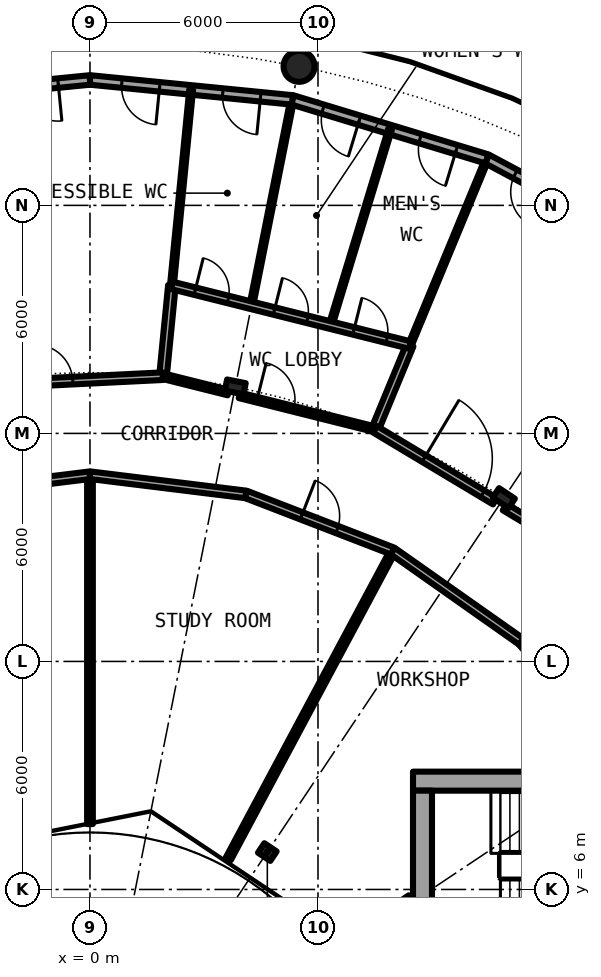
"""IFC4 building model, lengths in metres.
Left out: names, types, materials, properties, quantities, classifications, styles, units other than length and angle.
Written with IfcOpenShell. Run it as: python <this file> out.ifc"""

import sys

from ifc_helpers import new_model, si_unit, direction, frame, frame_2d, origin, origin_2d, place, context, subcontext, project, spatial, rectangle, hollow_circle, i_section, extrude, element, fill, save


model = new_model("IFC4")
c1 = context("Model", 3, precision=1e-05, world=origin(), true_north=direction((0.0, 1.0)))
c2 = subcontext(c1, "Body", "Model", "MODEL_VIEW")
j1 = project(units=[si_unit("LENGTHUNIT", "METRE"), si_unit("PLANEANGLEUNIT", "RADIAN")], contexts=[c1])
p1 = place(None, origin())
s1 = spatial("IfcSite", under=j1, at=p1, CompositionType="ELEMENT")
p2 = place(p1, origin())
s2 = spatial("IfcBuilding", under=s1, at=p2, CompositionType="ELEMENT")
p3 = place(p2, frame((0.0, 0.0, 157.4)))
s3 = spatial("IfcBuildingStorey", under=s2, at=p3, CompositionType="ELEMENT", Elevation=157.4)
p4 = place(p3, frame((5.501, 27.658, 0.0), z_axis=(0.0, 0.0, 1.0), x_axis=(1.0, 0.0, 0.0)))
e1 = element("IfcColumn", 1, at=p4, inside=s3, PredefinedType="COLUMN", context=c2, shape_type="SweptSolid", body=[
    extrude(hollow_circle(Radius=0.406, WallThickness=0.04, at=origin_2d()), origin(), (0.0, 0.0, 1.0), 4.2),
])
for number, where, z_axis, x_axis in (
    (2, (10.889, 16.297, 0.0), (0.0, 0.0, 1.0), (0.556, 0.831, 0.0)),
    (3, (3.824, 19.223, 0.0), (0.0, 0.0, 1.0), (0.195, 0.981, 0.0)),
):
    element("IfcColumn", number, at=place(p3, frame(where, z_axis=z_axis, x_axis=x_axis)), inside=s3, PredefinedType="COLUMN", context=c2, shape_type="SweptSolid", body=[
        extrude(i_section(OverallWidth=0.3, OverallDepth=0.5, WebThickness=0.014, FlangeThickness=0.028, FilletRadius=0.027, at=origin_2d()), origin(), (0.0, 0.0, 1.0), 4.2),
    ])
p5 = place(p3, frame((4.667, 6.984, 0.0), z_axis=(0.0, 0.0, 1.0), x_axis=(0.55557023302, 0.831469612303, 0.0)))
e4 = element("IfcColumn", 4, at=p5, inside=s3, PredefinedType="COLUMN", context=c2, shape_type="SweptSolid", body=[
    extrude(i_section(OverallWidth=0.3, OverallDepth=0.39, WebThickness=0.011, FlangeThickness=0.019, FilletRadius=0.027, at=origin_2d()), origin(), (0.0, 0.0, 1.0), 4.2),
])
p6 = place(p3, frame((15.167, 22.699, 0.0), z_axis=(0.0, 0.0, 1.0), x_axis=(-0.881915646801, 0.471407246368, 0.0)))
e5 = element("IfcWall", 5, at=p6, inside=s3, PredefinedType="SOLIDWALL", context=c2, shape_type="SweptSolid", body=[
    extrude(rectangle(XDim=5.352, YDim=0.25, at=frame_2d((2.676, 0.0))), origin(), (0.0, 0.0, 1.0), 3.85),
])
p7 = place(p6, frame((0.841, 0.0, 0.0)))
e6 = element("IfcOpeningElement", 6, at=p7, cuts=e5, PredefinedType="OPENING", context=c2, shape_type="SweptSolid", body=[
    extrude(rectangle(XDim=1.0, YDim=2.2, at=frame_2d((0.5, 1.1))), frame((0.0, 0.135, 0.0), z_axis=(0.0, -1.0, 0.0), x_axis=(1.0, 0.0, 0.0)), (0.0, 0.0, 1.0), 0.27),
])
p8 = place(p6, frame((3.51, 0.0, 0.0)))
e7 = element("IfcOpeningElement", 7, at=p8, cuts=e5, PredefinedType="OPENING", context=c2, shape_type="SweptSolid", body=[
    extrude(rectangle(XDim=1.0, YDim=2.2, at=frame_2d((0.5, 1.1))), frame((0.0, 0.135, 0.0), z_axis=(0.0, -1.0, 0.0), x_axis=(1.0, 0.0, 0.0)), (0.0, 0.0, 1.0), 0.27),
])
p9 = place(p3, frame((10.447, 25.222, 0.0), z_axis=(0.0, 0.0, 1.0), x_axis=(-0.956965678721, 0.290201119486, 0.0)))
e8 = element("IfcWall", 8, at=p9, inside=s3, PredefinedType="SOLIDWALL", context=c2, shape_type="SweptSolid", body=[
    extrude(rectangle(XDim=5.351, YDim=0.25, at=frame_2d((2.676, 0.0))), origin(), (0.0, 0.0, 1.0), 3.85),
])
p10 = place(p9, frame((0.841, 0.0, 0.0)))
e9 = element("IfcOpeningElement", 9, at=p10, cuts=e8, PredefinedType="OPENING", context=c2, shape_type="SweptSolid", body=[
    extrude(rectangle(XDim=1.0, YDim=2.2, at=frame_2d((0.5, 1.1))), frame((0.0, 0.135, 0.0), z_axis=(0.0, -1.0, 0.0), x_axis=(1.0, 0.0, 0.0)), (0.0, 0.0, 1.0), 0.27),
])
p11 = place(p9, frame((3.51, 0.0, 0.0)))
e10 = element("IfcOpeningElement", 10, at=p11, cuts=e8, PredefinedType="OPENING", context=c2, shape_type="SweptSolid", body=[
    extrude(rectangle(XDim=1.0, YDim=2.2, at=frame_2d((0.5, 1.1))), frame((0.0, 0.135, 0.0), z_axis=(0.0, -1.0, 0.0), x_axis=(1.0, 0.0, 0.0)), (0.0, 0.0, 1.0), 0.27),
])
p12 = place(p3, frame((5.326, 26.775, 0.0), z_axis=(0.0, 0.0, 1.0), x_axis=(-0.995173996315, 0.098126026407, 0.0)))
e11 = element("IfcWall", 11, at=p12, inside=s3, PredefinedType="SOLIDWALL", context=c2, shape_type="SweptSolid", body=[
    extrude(rectangle(XDim=5.352, YDim=0.25, at=frame_2d((2.676, 0.0))), origin(), (0.0, 0.0, 1.0), 3.85),
])
p13 = place(p12, frame((0.841, 0.0, 0.0)))
e12 = element("IfcOpeningElement", 12, at=p13, cuts=e11, PredefinedType="OPENING", context=c2, shape_type="SweptSolid", body=[
    extrude(rectangle(XDim=1.0, YDim=2.2, at=frame_2d((0.5, 1.1))), frame((0.0, 0.135, 0.0), z_axis=(0.0, -1.0, 0.0), x_axis=(1.0, 0.0, 0.0)), (0.0, 0.0, 1.0), 0.27),
])
p14 = place(p12, frame((3.51, 0.0, 0.0)))
e13 = element("IfcOpeningElement", 13, at=p14, cuts=e11, PredefinedType="OPENING", context=c2, shape_type="SweptSolid", body=[
    extrude(rectangle(XDim=1.0, YDim=2.2, at=frame_2d((0.5, 1.1))), frame((0.0, 0.135, 0.0), z_axis=(0.0, -1.0, 0.0), x_axis=(1.0, 0.0, 0.0)), (0.0, 0.0, 1.0), 0.27),
])
p15 = place(p3, frame((0.0, 27.3, 0.0), z_axis=(0.0, 0.0, 1.0), x_axis=(-0.995173996315, -0.098126026407, 0.0)))
e14 = element("IfcWall", 14, at=p15, inside=s3, PredefinedType="SOLIDWALL", context=c2, shape_type="SweptSolid", body=[
    extrude(rectangle(XDim=5.352, YDim=0.25, at=frame_2d((2.676, 0.0))), origin(), (0.0, 0.0, 1.0), 3.85),
])
p16 = place(p15, frame((0.841, 0.0, 0.0)))
e15 = element("IfcOpeningElement", 15, at=p16, cuts=e14, PredefinedType="OPENING", context=c2, shape_type="SweptSolid", body=[
    extrude(rectangle(XDim=1.0, YDim=2.2, at=frame_2d((0.5, 1.1))), frame((0.0, 0.135, 0.0), z_axis=(0.0, -1.0, 0.0), x_axis=(1.0, 0.0, 0.0)), (0.0, 0.0, 1.0), 0.27),
])
p17 = place(p15, frame((3.51, 0.0, 0.0)))
e16 = element("IfcOpeningElement", 16, at=p17, cuts=e14, PredefinedType="OPENING", context=c2, shape_type="SweptSolid", body=[
    extrude(rectangle(XDim=1.0, YDim=2.2, at=frame_2d((0.5, 1.1))), frame((0.0, 0.135, 0.0), z_axis=(0.0, -1.0, 0.0), x_axis=(1.0, 0.0, 0.0)), (0.0, 0.0, 1.0), 0.27),
])
p18 = place(p3, frame((22.1, 8.85, 0.0), z_axis=(0.0, 0.0, 1.0), x_axis=(-1.0, 0.0, 0.0)))
e17 = element("IfcWall", 17, at=p18, inside=s3, PredefinedType="SHEAR", context=c2, shape_type="SweptSolid", body=[
    extrude(rectangle(XDim=13.6, YDim=0.5, at=frame_2d((6.8, 0.0))), origin(), (0.0, 0.0, 1.0), 4.2),
])
p19 = place(p18, frame((1.025, 0.0, 0.0)))
e18 = element("IfcOpeningElement", 18, at=p19, cuts=e17, PredefinedType="OPENING", context=c2, shape_type="SweptSolid", body=[
    extrude(rectangle(XDim=1.2, YDim=2.3, at=frame_2d((0.6, 1.15))), frame((0.0, 0.26, 0.0), z_axis=(0.0, -1.0, 0.0), x_axis=(1.0, 0.0, 0.0)), (0.0, 0.0, 1.0), 0.52),
])
p20 = place(p3, frame((8.75, -8.6, 0.0), z_axis=(0.0, 0.0, 1.0), x_axis=(0.0, 1.0, 0.0)))
e19 = element("IfcWall", 19, at=p20, inside=s3, PredefinedType="SHEAR", context=c2, shape_type="SweptSolid", body=[
    extrude(rectangle(XDim=17.2, YDim=0.5, at=frame_2d((8.6, 0.0))), origin(), (0.0, 0.0, 1.0), 4.2),
])
p21 = place(p20, frame((7.4, 0.0, 0.1)))
e20 = element("IfcOpeningElement", 20, at=p21, cuts=e19, PredefinedType="OPENING", context=c2, shape_type="SweptSolid", body=[
    extrude(rectangle(XDim=2.4, YDim=2.2, at=frame_2d((1.2, 1.1))), frame((0.0, 0.26, 0.0), z_axis=(0.0, -1.0, 0.0), x_axis=(1.0, 0.0, 0.0)), (0.0, 0.0, 1.0), 0.52),
])
p22 = place(p3, frame((0.0, 7.72, 0.0), z_axis=(0.0, 0.0, 1.0), x_axis=(0.0, 1.0, 0.0)))
e21 = element("IfcWall", 21, at=p22, inside=s3, PredefinedType="PARTITIONING", context=c2, shape_type="SweptSolid", body=[
    extrude(rectangle(XDim=9.18, YDim=0.15, at=frame_2d((4.59, 0.0))), origin(), (0.0, 0.0, 1.0), 3.85),
])
p23 = place(p3, frame((1.921, 19.506, 0.0), z_axis=(0.0, 0.0, 1.0), x_axis=(0.097982433599, 0.995188144376, 0.0)))
e22 = element("IfcWall", 22, at=p23, inside=s3, PredefinedType="PARTITIONING", context=c2, shape_type="SweptSolid", body=[
    extrude(rectangle(XDim=2.399, YDim=0.2, at=frame_2d((1.2, 0.0))), origin(), (0.0, 0.0, 1.0), 3.85),
])
p24 = place(p3, frame((2.156, 21.894, 0.0), z_axis=(0.0, 0.0, 1.0), x_axis=(0.097990148768, 0.995187384739, 0.0)))
e23 = element("IfcWall", 23, at=p24, inside=s3, PredefinedType="PARTITIONING", context=c2, shape_type="SweptSolid", body=[
    extrude(rectangle(XDim=5.175, YDim=0.1, at=frame_2d((2.587, 0.0))), origin(), (0.0, 0.0, 1.0), 3.85),
])
p25 = place(p3, frame((3.641, 6.807, 0.0), z_axis=(0.0, 0.0, 1.0), x_axis=(0.471428625665, 0.881904218667, 0.0)))
e24 = element("IfcWall", 24, at=p25, inside=s3, PredefinedType="PARTITIONING", context=c2, shape_type="SweptSolid", body=[
    extrude(rectangle(XDim=9.18, YDim=0.15, at=frame_2d((4.59, 0.0))), origin(), (0.0, 0.0, 1.0), 3.85),
])
p26 = place(p3, frame((4.246, 21.371, 0.0), z_axis=(0.0, 0.0, 1.0), x_axis=(0.195122379873, 0.980778903154, 0.0)))
e25 = element("IfcWall", 25, at=p26, inside=s3, PredefinedType="PARTITIONING", context=c2, shape_type="SweptSolid", body=[
    extrude(rectangle(XDim=5.386, YDim=0.1, at=frame_2d((2.693, 0.0))), origin(), (0.0, 0.0, 1.0), 3.85),
])
p27 = place(p3, frame((6.331, 20.848, 0.0), z_axis=(0.0, 0.0, 1.0), x_axis=(0.290701687048, 0.956813737959, 0.0)))
e26 = element("IfcWall", 26, at=p27, inside=s3, PredefinedType="PARTITIONING", context=c2, shape_type="SweptSolid", body=[
    extrude(rectangle(XDim=5.387, YDim=0.1, at=frame_2d((2.693, 0.0))), origin(), (0.0, 0.0, 1.0), 3.85),
])
p28 = place(p3, frame((7.501, 18.108, 0.0), z_axis=(0.0, 0.0, 1.0), x_axis=(0.382555476978, 0.923932522988, 0.0)))
e27 = element("IfcWall", 27, at=p28, inside=s3, PredefinedType="PARTITIONING", context=c2, shape_type="SweptSolid", body=[
    extrude(rectangle(XDim=2.4, YDim=0.2, at=frame_2d((1.2, 0.0))), origin(), (0.0, 0.0, 1.0), 3.85),
])
p29 = place(p3, frame((8.419, 20.325, 0.0), z_axis=(0.0, 0.0, 1.0), x_axis=(0.382621247276, 0.923905287967, 0.0)))
e28 = element("IfcWall", 28, at=p29, inside=s3, PredefinedType="PARTITIONING", context=c2, shape_type="SweptSolid", body=[
    extrude(rectangle(XDim=5.175, YDim=0.1, at=frame_2d((2.587, 0.0))), origin(), (0.0, 0.0, 1.0), 3.85),
])
p30 = place(p3, frame((6.513, 4.472, 0.0), z_axis=(0.0, 0.0, 1.0), x_axis=(0.83133816625, 0.555766905579, 0.0)))
e29 = element("IfcWall", 29, at=p30, inside=s3, PredefinedType="PARTITIONING", context=c2, shape_type="SweptSolid", body=[
    extrude(rectangle(XDim=2.323, YDim=0.2, at=frame_2d((1.162, 0.0))), origin(), (0.0, 0.0, 1.0), 3.85),
])
for number, where, z_axis, x_axis in (
    (30, (-4.106, 16.394, 0.0), (0.0, 0.0, 1.0), (0.992, 0.122, 0.0)),
    (31, (0.0, 16.9, 0.0), (0.0, 0.0, 1.0), (0.992, -0.122, 0.0)),
):
    element("IfcWall", number, at=place(p3, frame(where, z_axis=z_axis, x_axis=x_axis)), inside=s3, PredefinedType="PARTITIONING", context=c2, shape_type="SweptSolid", body=[
        extrude(rectangle(XDim=4.137, YDim=0.2, at=frame_2d((2.068, 0.0))), origin(), (0.0, 0.0, 1.0), 3.85),
    ])
p31 = place(p3, frame((4.106, 16.394, 0.0), z_axis=(0.0, 0.0, 1.0), x_axis=(0.932943640288, -0.360022449363, 0.0)))
e32 = element("IfcWall", 32, at=p31, inside=s3, PredefinedType="PARTITIONING", context=c2, shape_type="SweptSolid", body=[
    extrude(rectangle(XDim=4.139, YDim=0.2, at=frame_2d((2.069, 0.0))), origin(), (0.0, 0.0, 1.0), 3.85),
])
p32 = place(p31, frame((1.569, 0.0, 0.0)))
e33 = element("IfcOpeningElement", 33, at=p32, cuts=e32, PredefinedType="OPENING", context=c2, shape_type="SweptSolid", body=[
    extrude(rectangle(XDim=1.0, YDim=2.3, at=frame_2d((0.5, 1.15))), frame((0.0, 0.11, 0.0), z_axis=(0.0, -1.0, 0.0), x_axis=(1.0, 0.0, 0.0)), (0.0, 0.0, 1.0), 0.22),
])
p33 = place(p3, frame((7.967, 14.904, 0.0), z_axis=(0.0, 0.0, 1.0), x_axis=(0.817567680547, -0.575832517079, 0.0)))
e34 = element("IfcWall", 34, at=p33, inside=s3, PredefinedType="PARTITIONING", context=c2, shape_type="SweptSolid", body=[
    extrude(rectangle(XDim=4.137, YDim=0.2, at=frame_2d((2.068, 0.0))), origin(), (0.0, 0.0, 1.0), 3.85),
])
p34 = place(p3, frame((11.349, 12.522, 0.0), z_axis=(0.0, 0.0, 1.0), x_axis=(0.653273870261, -0.757121687996, 0.0)))
e35 = element("IfcWall", 35, at=p34, inside=s3, PredefinedType="PARTITIONING", context=c2, shape_type="SweptSolid", body=[
    extrude(rectangle(XDim=4.189, YDim=0.2, at=frame_2d((2.095, 0.0))), origin(), (0.0, 0.0, 1.0), 3.85),
])
p35 = place(p34, frame((1.569, 0.0, 0.0)))
e36 = element("IfcOpeningElement", 36, at=p35, cuts=e35, PredefinedType="OPENING", context=c2, shape_type="SweptSolid", body=[
    extrude(rectangle(XDim=1.0, YDim=2.3, at=frame_2d((0.5, 1.15))), frame((0.0, 0.11, 0.0), z_axis=(0.0, -1.0, 0.0), x_axis=(1.0, 0.0, 0.0)), (0.0, 0.0, 1.0), 0.22),
])
p36 = place(p3, frame((-3.672, 19.23, 0.0), z_axis=(0.0, 0.0, 1.0), x_axis=(0.998783562084, 0.049309188909, 0.0)))
e37 = element("IfcWall", 37, at=p36, inside=s3, PredefinedType="PARTITIONING", context=c2, shape_type="SweptSolid", body=[
    extrude(rectangle(XDim=5.6, YDim=0.2, at=frame_2d((2.8, 0.0))), origin(), (0.0, 0.0, 1.0), 3.54),
])
p37 = place(p36, frame((2.224, 0.0, 0.0)))
e38 = element("IfcOpeningElement", 38, at=p37, cuts=e37, PredefinedType="OPENING", context=c2, shape_type="SweptSolid", body=[
    extrude(rectangle(XDim=1.0, YDim=2.3, at=frame_2d((0.5, 1.15))), frame((0.0, 0.11, 0.0), z_axis=(0.0, -1.0, 0.0), x_axis=(1.0, 0.0, 0.0)), (0.0, 0.0, 1.0), 0.22),
])
p38 = place(p3, frame((1.921, 19.506, 0.0), z_axis=(0.0, 0.0, 1.0), x_axis=(0.969996560647, -0.243118638391, 0.0)))
e39 = element("IfcWall", 39, at=p38, inside=s3, PredefinedType="PARTITIONING", context=c2, shape_type="SweptSolid", body=[
    extrude(rectangle(XDim=1.773, YDim=0.15, at=frame_2d((0.887, 0.0))), origin(), (0.0, 0.0, 1.0), 3.54),
])
p39 = place(p3, frame((3.933, 19.002, 0.0), z_axis=(0.0, 0.0, 1.0), x_axis=(0.970009604092, -0.243066591637, 0.0)))
e40 = element("IfcWall", 40, at=p39, inside=s3, PredefinedType="PARTITIONING", context=c2, shape_type="SweptSolid", body=[
    extrude(rectangle(XDim=3.678, YDim=0.15, at=frame_2d((1.839, 0.0))), origin(), (0.0, 0.0, 1.0), 3.54),
])
p40 = place(p39, frame((0.476, 0.0, 0.0)))
e41 = element("IfcOpeningElement", 41, at=p40, cuts=e40, PredefinedType="OPENING", context=c2, shape_type="SweptSolid", body=[
    extrude(rectangle(XDim=1.0, YDim=2.3, at=frame_2d((0.5, 1.15))), frame((0.0, 0.085, 0.0), z_axis=(0.0, -1.0, 0.0), x_axis=(1.0, 0.0, 0.0)), (0.0, 0.0, 1.0), 0.17),
])
p41 = place(p3, frame((7.501, 18.108, 0.0), z_axis=(0.0, 0.0, 1.0), x_axis=(0.857750505244, -0.514066212421, 0.0)))
e42 = element("IfcWall", 42, at=p41, inside=s3, PredefinedType="PARTITIONING", context=c2, shape_type="SweptSolid", body=[
    extrude(rectangle(XDim=3.678, YDim=0.2, at=frame_2d((1.839, 0.0))), origin(), (0.0, 0.0, 1.0), 3.54),
])
p42 = place(p41, frame((1.5, 0.0, 0.0)))
e43 = element("IfcOpeningElement", 43, at=p42, cuts=e42, PredefinedType="OPENING", context=c2, shape_type="SweptSolid", body=[
    extrude(rectangle(XDim=1.8, YDim=2.3, at=frame_2d((0.9, 1.15))), frame((0.0, 0.11, 0.0), z_axis=(0.0, -1.0, 0.0), x_axis=(1.0, 0.0, 0.0)), (0.0, 0.0, 1.0), 0.22),
])
p43 = place(p3, frame((10.913, 16.063, 0.0), z_axis=(0.0, 0.0, 1.0), x_axis=(0.857614365469, -0.514293301668, 0.0)))
e44 = element("IfcWall", 44, at=p43, inside=s3, PredefinedType="PARTITIONING", context=c2, shape_type="SweptSolid", body=[
    extrude(rectangle(XDim=1.773, YDim=0.2, at=frame_2d((0.887, 0.0))), origin(), (0.0, 0.0, 1.0), 3.54),
])
p44 = place(p3, frame((2.156, 21.894, 0.0), z_axis=(0.0, 0.0, 1.0), x_axis=(0.970020040157, -0.243024940478, 0.0)))
e45 = element("IfcWall", 45, at=p44, inside=s3, PredefinedType="PARTITIONING", context=c2, shape_type="SweptSolid", body=[
    extrude(rectangle(XDim=6.457, YDim=0.2, at=frame_2d((3.228, 0.0))), origin(), (0.0, 0.0, 1.0), 3.85),
])
p45 = place(p44, frame((4.93, 0.0, 0.0)))
e46 = element("IfcOpeningElement", 46, at=p45, cuts=e45, PredefinedType="OPENING", context=c2, shape_type="SweptSolid", body=[
    extrude(rectangle(XDim=0.9, YDim=2.3, at=frame_2d((0.45, 1.15))), frame((0.0, 0.11, 0.0), z_axis=(0.0, -1.0, 0.0), x_axis=(1.0, 0.0, 0.0)), (0.0, 0.0, 1.0), 0.22),
])
p46 = place(p44, frame((2.774, 0.0, 0.0)))
e47 = element("IfcOpeningElement", 47, at=p46, cuts=e45, PredefinedType="OPENING", context=c2, shape_type="SweptSolid", body=[
    extrude(rectangle(XDim=0.9, YDim=2.3, at=frame_2d((0.45, 1.15))), frame((0.0, 0.11, 0.0), z_axis=(0.0, -1.0, 0.0), x_axis=(1.0, 0.0, 0.0)), (0.0, 0.0, 1.0), 0.22),
])
p47 = place(p44, frame((0.625, 0.0, 0.0)))
e48 = element("IfcOpeningElement", 48, at=p47, cuts=e45, PredefinedType="OPENING", context=c2, shape_type="SweptSolid", body=[
    extrude(rectangle(XDim=0.9, YDim=2.3, at=frame_2d((0.45, 1.15))), frame((0.0, 0.11, 0.0), z_axis=(0.0, -1.0, 0.0), x_axis=(1.0, 0.0, 0.0)), (0.0, 0.0, 1.0), 0.22),
])
p48 = place(p8, origin())
e49 = element("IfcDoor", 49, at=p48, inside=s3, OperationType="SINGLE_SWING_LEFT", PredefinedType="DOOR", context=c2, shape_type="SweptSolid", body=[
    extrude(rectangle(XDim=1.0, YDim=2.2, at=frame_2d((0.5, 1.1))), frame((0.0, 0.025, 0.0), z_axis=(0.0, -1.0, 0.0), x_axis=(1.0, 0.0, 0.0)), (0.0, 0.0, 1.0), 0.05),
])
fill(e7, e49)
p49 = place(p10, origin())
e50 = element("IfcDoor", 50, at=p49, inside=s3, OperationType="SINGLE_SWING_LEFT", PredefinedType="DOOR", context=c2, shape_type="SweptSolid", body=[
    extrude(rectangle(XDim=1.0, YDim=2.2, at=frame_2d((0.5, 1.1))), frame((0.0, 0.025, 0.0), z_axis=(0.0, -1.0, 0.0), x_axis=(1.0, 0.0, 0.0)), (0.0, 0.0, 1.0), 0.05),
])
fill(e9, e50)
p50 = place(p11, origin())
e51 = element("IfcDoor", 51, at=p50, inside=s3, OperationType="SINGLE_SWING_LEFT", PredefinedType="DOOR", context=c2, shape_type="SweptSolid", body=[
    extrude(rectangle(XDim=1.0, YDim=2.2, at=frame_2d((0.5, 1.1))), frame((0.0, 0.025, 0.0), z_axis=(0.0, -1.0, 0.0), x_axis=(1.0, 0.0, 0.0)), (0.0, 0.0, 1.0), 0.05),
])
fill(e10, e51)
p51 = place(p13, origin())
e52 = element("IfcDoor", 52, at=p51, inside=s3, OperationType="SINGLE_SWING_LEFT", PredefinedType="DOOR", context=c2, shape_type="SweptSolid", body=[
    extrude(rectangle(XDim=1.0, YDim=2.2, at=frame_2d((0.5, 1.1))), frame((0.0, 0.025, 0.0), z_axis=(0.0, -1.0, 0.0), x_axis=(1.0, 0.0, 0.0)), (0.0, 0.0, 1.0), 0.05),
])
fill(e12, e52)
p52 = place(p14, origin())
e53 = element("IfcDoor", 53, at=p52, inside=s3, OperationType="SINGLE_SWING_LEFT", PredefinedType="DOOR", context=c2, shape_type="SweptSolid", body=[
    extrude(rectangle(XDim=1.0, YDim=2.2, at=frame_2d((0.5, 1.1))), frame((0.0, 0.025, 0.0), z_axis=(0.0, -1.0, 0.0), x_axis=(1.0, 0.0, 0.0)), (0.0, 0.0, 1.0), 0.05),
])
fill(e13, e53)
p53 = place(p16, origin())
e54 = element("IfcDoor", 54, at=p53, inside=s3, OperationType="SINGLE_SWING_LEFT", PredefinedType="DOOR", context=c2, shape_type="SweptSolid", body=[
    extrude(rectangle(XDim=1.0, YDim=2.2, at=frame_2d((0.5, 1.1))), frame((0.0, 0.025, 0.0), z_axis=(0.0, -1.0, 0.0), x_axis=(1.0, 0.0, 0.0)), (0.0, 0.0, 1.0), 0.05),
])
fill(e15, e54)
p54 = place(p40, origin())
e55 = element("IfcDoor", 55, at=p54, inside=s3, OperationType="SINGLE_SWING_LEFT", PredefinedType="DOOR", context=c2, shape_type="SweptSolid", body=[
    extrude(rectangle(XDim=1.0, YDim=2.3, at=frame_2d((0.5, 1.15))), frame((0.0, 0.025, 0.0), z_axis=(0.0, -1.0, 0.0), x_axis=(1.0, 0.0, 0.0)), (0.0, 0.0, 1.0), 0.05),
])
fill(e41, e55)
p55 = place(p45, origin())
e56 = element("IfcDoor", 56, at=p55, inside=s3, OperationType="SINGLE_SWING_RIGHT", PredefinedType="DOOR", context=c2, shape_type="SweptSolid", body=[
    extrude(rectangle(XDim=0.9, YDim=2.3, at=frame_2d((0.45, 1.15))), frame((0.0, 0.025, 0.0), z_axis=(0.0, -1.0, 0.0), x_axis=(1.0, 0.0, 0.0)), (0.0, 0.0, 1.0), 0.05),
])
fill(e46, e56)
p56 = place(p46, origin())
e57 = element("IfcDoor", 57, at=p56, inside=s3, OperationType="SINGLE_SWING_LEFT", PredefinedType="DOOR", context=c2, shape_type="SweptSolid", body=[
    extrude(rectangle(XDim=0.9, YDim=2.3, at=frame_2d((0.45, 1.15))), frame((0.0, 0.025, 0.0), z_axis=(0.0, -1.0, 0.0), x_axis=(1.0, 0.0, 0.0)), (0.0, 0.0, 1.0), 0.05),
])
fill(e47, e57)
p57 = place(p47, origin())
e58 = element("IfcDoor", 58, at=p57, inside=s3, OperationType="SINGLE_SWING_LEFT", PredefinedType="DOOR", context=c2, shape_type="SweptSolid", body=[
    extrude(rectangle(XDim=0.9, YDim=2.3, at=frame_2d((0.45, 1.15))), frame((0.0, 0.025, 0.0), z_axis=(0.0, -1.0, 0.0), x_axis=(1.0, 0.0, 0.0)), (0.0, 0.0, 1.0), 0.05),
])
fill(e48, e58)
p58 = place(p42, origin())
e59 = element("IfcDoor", 59, at=p58, inside=s3, OperationType="DOUBLE_DOOR_SINGLE_SWING", PredefinedType="DOOR", context=c2, shape_type="SweptSolid", body=[
    extrude(rectangle(XDim=1.8, YDim=2.3, at=frame_2d((0.9, 1.15))), frame((0.0, 0.025, 0.0), z_axis=(0.0, -1.0, 0.0), x_axis=(1.0, 0.0, 0.0)), (0.0, 0.0, 1.0), 0.05),
])
fill(e43, e59)
p59 = place(p37, origin())
e60 = element("IfcDoor", 60, at=p59, inside=s3, OperationType="SINGLE_SWING_LEFT", PredefinedType="DOOR", context=c2, shape_type="SweptSolid", body=[
    extrude(rectangle(XDim=1.0, YDim=2.3, at=frame_2d((0.5, 1.15))), frame((0.0, 0.025, 0.0), z_axis=(0.0, -1.0, 0.0), x_axis=(1.0, 0.0, 0.0)), (0.0, 0.0, 1.0), 0.05),
])
fill(e38, e60)
p60 = place(p32, origin())
e61 = element("IfcDoor", 61, at=p60, inside=s3, OperationType="SINGLE_SWING_LEFT", PredefinedType="DOOR", context=c2, shape_type="SweptSolid", body=[
    extrude(rectangle(XDim=1.0, YDim=2.3, at=frame_2d((0.5, 1.15))), frame((0.0, 0.025, 0.0), z_axis=(0.0, -1.0, 0.0), x_axis=(1.0, 0.0, 0.0)), (0.0, 0.0, 1.0), 0.05),
])
fill(e33, e61)
save(model, sys.argv[1])
